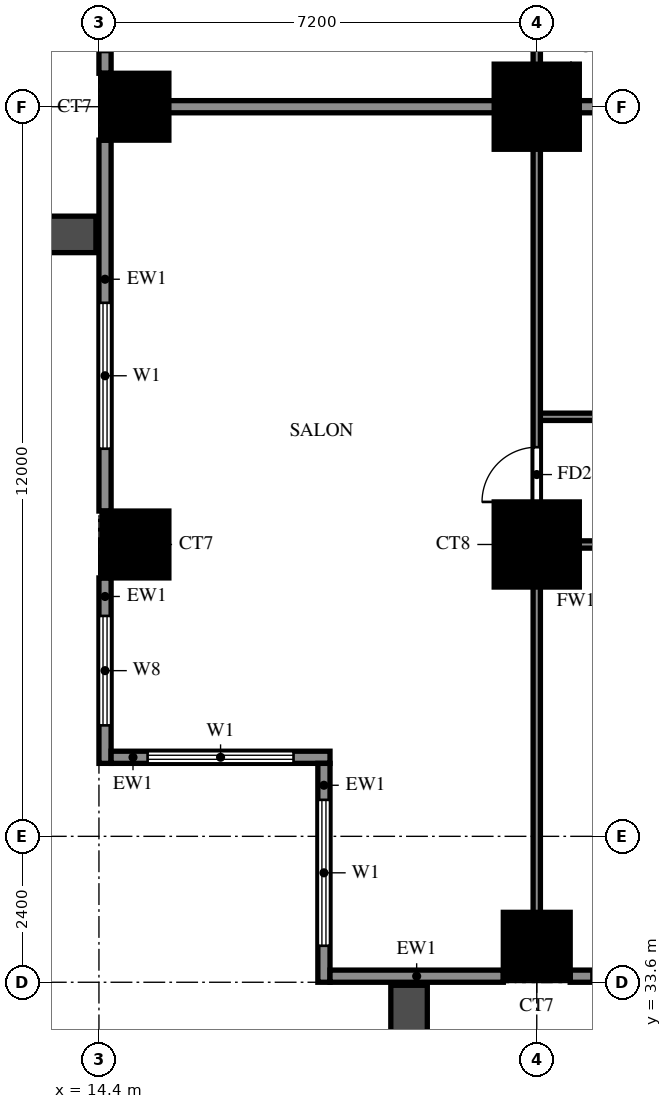
"""IFC4 building model, lengths in metres.
Left out: names, types, materials, properties, quantities, classifications, styles, units other than length and angle.
Written with IfcOpenShell. Run it as: python <this file> out.ifc"""

import sys

from ifc_helpers import new_model, si_unit, direction, frame, frame_2d, origin, origin_2d, place, context, subcontext, project, spatial, rectangle, extrude, source, transform, mapped, element, fill, save


model = new_model("IFC4")
c1 = context("Model", 3, precision=1e-05, world=origin(), true_north=direction((0.0, 1.0)))
c2 = subcontext(c1, "Body", "Model", "MODEL_VIEW")
j1 = project(units=[si_unit("LENGTHUNIT", "METRE"), si_unit("PLANEANGLEUNIT", "RADIAN")], contexts=[c1])
p1 = place(None, origin())
s1 = spatial("IfcSite", under=j1, at=p1, CompositionType="ELEMENT")
p2 = place(p1, origin())
s2 = spatial("IfcBuilding", under=s1, at=p2, CompositionType="ELEMENT")
p3 = place(p2, frame((0.0, 0.0, 41.0)))
s3 = spatial("IfcBuildingStorey", under=s2, at=p3, CompositionType="ELEMENT", Elevation=41.0)
m1 = source(origin(), c2, "Body", "SweptSolid", [
    extrude(rectangle(XDim=1.1, YDim=1.1, at=origin_2d()), origin(), (0.0, 0.0, 1.0), 3.18),
])
for number, where, z_axis, x_axis in (
    (1, (21.6, 34.2, 0.0), (0.0, 0.0, 1.0), (1.0, 0.0, 0.0)),
    (2, (15.0, 40.8, 0.0), (0.0, 0.0, 1.0), (1.0, 0.0, 0.0)),
):
    element("IfcColumn", number, at=place(p3, frame(where, z_axis=z_axis, x_axis=x_axis)), inside=s3, PredefinedType="COLUMN", context=c2, shape_type="MappedRepresentation", body=[
        mapped(m1, transform((0.0, 0.0, 0.0))),
    ])
m2 = source(origin(), c2, "Body", "SweptSolid", [
    extrude(rectangle(XDim=1.4, YDim=1.4, at=origin_2d()), origin(), (0.0, 0.0, 1.0), 3.18),
])
p4 = place(p3, frame((21.6, 40.8, 0.0), z_axis=(0.0, 0.0, 1.0), x_axis=(1.0, 0.0, 0.0)))
e3 = element("IfcColumn", 3, at=p4, inside=s3, PredefinedType="COLUMN", context=c2, shape_type="MappedRepresentation", body=[
    mapped(m2, transform((0.0, 0.0, 0.0))),
])
p5 = place(p3, frame((15.0, 48.0, 0.0), z_axis=(0.0, 0.0, 1.0), x_axis=(1.0, 0.0, 0.0)))
e4 = element("IfcColumn", 4, at=p5, inside=s3, PredefinedType="COLUMN", context=c2, shape_type="MappedRepresentation", body=[
    mapped(m1, transform((0.0, 0.0, 0.0))),
])
p6 = place(p3, frame((21.6, 48.0, 0.0), z_axis=(0.0, 0.0, 1.0), x_axis=(1.0, 0.0, 0.0)))
e5 = element("IfcColumn", 5, at=p6, inside=s3, PredefinedType="COLUMN", context=c2, shape_type="MappedRepresentation", body=[
    mapped(m2, transform((0.0, 0.0, 0.0))),
])
p7 = place(p3, frame((14.5, 54.65, 0.0), z_axis=(0.0, 0.0, 1.0), x_axis=(0.0, -1.0, 0.0)))
e6 = element("IfcWall", 6, at=p7, inside=s3, PredefinedType="SOLIDWALL", context=c2, shape_type="SweptSolid", body=[
    extrude(rectangle(XDim=6.1, YDim=0.2, at=frame_2d((3.05, 0.0))), origin(), (0.0, 0.0, 1.0), 3.18),
])
p8 = place(p7, frame((3.95, 0.0, 0.0)))
e7 = element("IfcOpeningElement", 7, at=p8, cuts=e6, PredefinedType="OPENING", context=c2, shape_type="SweptSolid", body=[
    extrude(rectangle(XDim=1.8, YDim=2.4, at=frame_2d((0.9, 1.2))), frame((0.0, 0.11, 0.0), z_axis=(0.0, -1.0, 0.0), x_axis=(1.0, 0.0, 0.0)), (0.0, 0.0, 1.0), 0.22),
])
p9 = place(p7, frame((0.425, 0.0, 0.6)))
e8 = element("IfcOpeningElement", 8, at=p9, cuts=e6, PredefinedType="OPENING", context=c2, shape_type="SweptSolid", body=[
    extrude(rectangle(XDim=1.2, YDim=2.4, at=frame_2d((0.6, 1.2))), frame((0.0, 0.11, 0.0), z_axis=(0.0, -1.0, 0.0), x_axis=(1.0, 0.0, 0.0)), (0.0, 0.0, 1.0), 0.22),
])
p10 = place(p3, frame((14.5, 47.45, 0.0), z_axis=(0.0, 0.0, 1.0), x_axis=(0.0, -1.0, 0.0)))
e9 = element("IfcWall", 9, at=p10, inside=s3, PredefinedType="SOLIDWALL", context=c2, shape_type="SweptSolid", body=[
    extrude(rectangle(XDim=6.1, YDim=0.2, at=frame_2d((3.05, 0.0))), origin(), (0.0, 0.0, 1.0), 3.18),
])
p11 = place(p10, frame((2.675, 0.0, 0.6)))
e10 = element("IfcOpeningElement", 10, at=p11, cuts=e9, PredefinedType="OPENING", context=c2, shape_type="SweptSolid", body=[
    extrude(rectangle(XDim=2.4, YDim=2.4, at=frame_2d((1.2, 1.2))), frame((0.0, 0.11, 0.0), z_axis=(0.0, -1.0, 0.0), x_axis=(1.0, 0.0, 0.0)), (0.0, 0.0, 1.0), 0.22),
])
p12 = place(p3, frame((14.5, 40.25, 0.0), z_axis=(0.0, 0.0, 1.0), x_axis=(0.0, -1.0, 0.0)))
e11 = element("IfcWall", 11, at=p12, inside=s3, PredefinedType="SOLIDWALL", context=c2, shape_type="SweptSolid", body=[
    extrude(rectangle(XDim=3.05, YDim=0.2, at=frame_2d((1.525, 0.0))), origin(), (0.0, 0.0, 1.0), 3.18),
])
p13 = place(p12, frame((0.625, 0.0, 0.6)))
e12 = element("IfcOpeningElement", 12, at=p13, cuts=e11, PredefinedType="OPENING", context=c2, shape_type="SweptSolid", body=[
    extrude(rectangle(XDim=1.8, YDim=2.4, at=frame_2d((0.9, 1.2))), frame((0.0, 0.11, 0.0), z_axis=(0.0, -1.0, 0.0), x_axis=(1.0, 0.0, 0.0)), (0.0, 0.0, 1.0), 0.22),
])
p14 = place(p3, frame((14.6, 37.3, 0.0), z_axis=(0.0, 0.0, 1.0), x_axis=(1.0, 0.0, 0.0)))
e13 = element("IfcWall", 13, at=p14, inside=s3, PredefinedType="SOLIDWALL", context=c2, shape_type="SweptSolid", body=[
    extrude(rectangle(XDim=3.6, YDim=0.2, at=frame_2d((1.8, 0.0))), origin(), (0.0, 0.0, 1.0), 3.18),
])
p15 = place(p14, frame((0.6, 0.0, 0.6)))
e14 = element("IfcOpeningElement", 14, at=p15, cuts=e13, PredefinedType="OPENING", context=c2, shape_type="SweptSolid", body=[
    extrude(rectangle(XDim=2.4, YDim=2.4, at=frame_2d((1.2, 1.2))), frame((0.0, 0.11, 0.0), z_axis=(0.0, -1.0, 0.0), x_axis=(1.0, 0.0, 0.0)), (0.0, 0.0, 1.0), 0.22),
])
p16 = place(p3, frame((18.1, 37.2, 0.0), z_axis=(0.0, 0.0, 1.0), x_axis=(0.0, -1.0, 0.0)))
e15 = element("IfcWall", 15, at=p16, inside=s3, PredefinedType="SOLIDWALL", context=c2, shape_type="SweptSolid", body=[
    extrude(rectangle(XDim=3.6, YDim=0.2, at=frame_2d((1.8, 0.0))), origin(), (0.0, 0.0, 1.0), 3.18),
])
p17 = place(p16, frame((0.6, 0.0, 0.6)))
e16 = element("IfcOpeningElement", 16, at=p17, cuts=e15, PredefinedType="OPENING", context=c2, shape_type="SweptSolid", body=[
    extrude(rectangle(XDim=2.4, YDim=2.4, at=frame_2d((1.2, 1.2))), frame((0.0, 0.11, 0.0), z_axis=(0.0, -1.0, 0.0), x_axis=(1.0, 0.0, 0.0)), (0.0, 0.0, 1.0), 0.22),
])
p18 = place(p3, frame((18.2, 33.7, 0.0), z_axis=(0.0, 0.0, 1.0), x_axis=(1.0, 0.0, 0.0)))
e17 = element("IfcWall", 17, at=p18, inside=s3, PredefinedType="SOLIDWALL", context=c2, shape_type="SweptSolid", body=[
    extrude(rectangle(XDim=2.85, YDim=0.2, at=frame_2d((1.425, 0.0))), origin(), (0.0, 0.0, 1.0), 3.18),
])
p19 = place(p3, frame((22.15, 33.7, 0.0), z_axis=(0.0, 0.0, 1.0), x_axis=(1.0, 0.0, 0.0)))
e18 = element("IfcWall", 18, at=p19, inside=s3, PredefinedType="SOLIDWALL", context=c2, shape_type="SweptSolid", body=[
    extrude(rectangle(XDim=6.1, YDim=0.2, at=frame_2d((3.05, 0.0))), origin(), (0.0, 0.0, 1.0), 3.18),
])
p20 = place(p19, frame((0.35, 0.0, 0.0)))
e19 = element("IfcOpeningElement", 19, at=p20, cuts=e18, PredefinedType="OPENING", context=c2, shape_type="SweptSolid", body=[
    extrude(rectangle(XDim=1.8, YDim=2.4, at=frame_2d((0.9, 1.2))), frame((0.0, 0.11, 0.0), z_axis=(0.0, -1.0, 0.0), x_axis=(1.0, 0.0, 0.0)), (0.0, 0.0, 1.0), 0.22),
])
p21 = place(p19, frame((4.625, 0.0, 1.5)))
e20 = element("IfcOpeningElement", 20, at=p21, cuts=e18, PredefinedType="OPENING", context=c2, shape_type="SweptSolid", body=[
    extrude(rectangle(XDim=0.9, YDim=0.9, at=frame_2d((0.45, 0.45))), frame((0.0, 0.11, 0.0), z_axis=(0.0, -1.0, 0.0), x_axis=(1.0, 0.0, 0.0)), (0.0, 0.0, 1.0), 0.22),
])
for number, where, z_axis, x_axis in (
    (21, (14.35, 45.9, 0.0), (0.0, 0.0, 1.0), (-1.0, 0.0, 0.0)),
    (22, (19.5, 33.55, 0.0), (0.0, 0.0, 1.0), (0.0, -1.0, 0.0)),
):
    element("IfcWall", number, at=place(p3, frame(where, z_axis=z_axis, x_axis=x_axis)), inside=s3, PredefinedType="SOLIDWALL", context=c2, shape_type="SweptSolid", body=[
        extrude(rectangle(XDim=2.65, YDim=0.6, at=frame_2d((1.325, 0.0))), origin(), (0.0, 0.0, 1.0), 2.85),
    ])
p22 = place(p3, frame((14.525, 48.0, 0.0), z_axis=(0.0, 0.0, 1.0), x_axis=(1.0, 0.0, 0.0)))
e23 = element("IfcWall", 23, at=p22, inside=s3, PredefinedType="SOLIDWALL", context=c2, shape_type="SweptSolid", body=[
    extrude(rectangle(XDim=19.075, YDim=0.2, at=frame_2d((9.538, 0.0))), origin(), (0.0, 0.0, 1.0), 3.18),
])
p23 = place(p3, frame((21.6, 40.8, 0.0), z_axis=(0.0, 0.0, 1.0), x_axis=(1.0, 0.0, 0.0)))
e24 = element("IfcWall", 24, at=p23, inside=s3, PredefinedType="PARTITIONING", context=c2, shape_type="SweptSolid", body=[
    extrude(rectangle(XDim=3.6, YDim=0.12, at=frame_2d((1.8, 0.0))), origin(), (0.0, 0.0, 1.0), 3.18),
])
p24 = place(p23, frame((1.35, 0.0, 0.0)))
e25 = element("IfcOpeningElement", 25, at=p24, cuts=e24, PredefinedType="OPENING", context=c2, shape_type="SweptSolid", body=[
    extrude(rectangle(XDim=0.9, YDim=2.1, at=frame_2d((0.45, 1.05))), frame((0.0, 0.07, 0.0), z_axis=(0.0, -1.0, 0.0), x_axis=(1.0, 0.0, 0.0)), (0.0, 0.0, 1.0), 0.14),
])
p25 = place(p3, frame((21.6, 42.9, 0.0), z_axis=(0.0, 0.0, 1.0), x_axis=(1.0, 0.0, 0.0)))
e26 = element("IfcWall", 26, at=p25, inside=s3, PredefinedType="PARTITIONING", context=c2, shape_type="SweptSolid", body=[
    extrude(rectangle(XDim=14.4, YDim=0.12, at=frame_2d((7.2, 0.0))), origin(), (0.0, 0.0, 1.0), 3.18),
])
p26 = place(p25, frame((2.1, 0.0, 0.0)))
e27 = element("IfcOpeningElement", 27, at=p26, cuts=e26, PredefinedType="OPENING", context=c2, shape_type="SweptSolid", body=[
    extrude(rectangle(XDim=0.9, YDim=2.1, at=frame_2d((0.45, 1.05))), frame((0.0, 0.07, 0.0), z_axis=(0.0, -1.0, 0.0), x_axis=(1.0, 0.0, 0.0)), (0.0, 0.0, 1.0), 0.14),
])
p27 = place(p25, frame((5.85, 0.0, 0.0)))
e28 = element("IfcOpeningElement", 28, at=p27, cuts=e26, PredefinedType="OPENING", context=c2, shape_type="SweptSolid", body=[
    extrude(rectangle(XDim=0.8, YDim=2.1, at=frame_2d((0.4, 1.05))), frame((0.0, 0.07, 0.0), z_axis=(0.0, -1.0, 0.0), x_axis=(1.0, 0.0, 0.0)), (0.0, 0.0, 1.0), 0.14),
])
p28 = place(p25, frame((9.25, 0.0, 0.0)))
e29 = element("IfcOpeningElement", 29, at=p28, cuts=e26, PredefinedType="OPENING", context=c2, shape_type="SweptSolid", body=[
    extrude(rectangle(XDim=0.9, YDim=2.1, at=frame_2d((0.45, 1.05))), frame((0.0, 0.07, 0.0), z_axis=(0.0, -1.0, 0.0), x_axis=(1.0, 0.0, 0.0)), (0.0, 0.0, 1.0), 0.14),
])
p29 = place(p3, frame((21.6, 33.725, 0.0), z_axis=(0.0, 0.0, 1.0), x_axis=(0.0, 1.0, 0.0)))
e30 = element("IfcWall", 30, at=p29, inside=s3, PredefinedType="PARTITIONING", context=c2, shape_type="SweptSolid", body=[
    extrude(rectangle(XDim=35.875, YDim=0.12, at=frame_2d((17.938, 0.0))), origin(), (0.0, 0.0, 1.0), 3.18),
])
p30 = place(p29, frame((7.775, 0.0, 0.0)))
e31 = element("IfcOpeningElement", 31, at=p30, cuts=e30, PredefinedType="OPENING", context=c2, shape_type="SweptSolid", body=[
    extrude(rectangle(XDim=0.9, YDim=2.1, at=frame_2d((0.45, 1.05))), frame((0.0, 0.07, 0.0), z_axis=(0.0, -1.0, 0.0), x_axis=(1.0, 0.0, 0.0)), (0.0, 0.0, 1.0), 0.14),
])
p31 = place(p29, frame((15.625, 0.0, 0.0)))
e32 = element("IfcOpeningElement", 32, at=p31, cuts=e30, PredefinedType="OPENING", context=c2, shape_type="SweptSolid", body=[
    extrude(rectangle(XDim=0.9, YDim=2.1, at=frame_2d((0.45, 1.05))), frame((0.0, 0.07, 0.0), z_axis=(0.0, -1.0, 0.0), x_axis=(1.0, 0.0, 0.0)), (0.0, 0.0, 1.0), 0.14),
])
p32 = place(p29, frame((22.225, 0.0, 0.0)))
e33 = element("IfcOpeningElement", 33, at=p32, cuts=e30, PredefinedType="OPENING", context=c2, shape_type="SweptSolid", body=[
    extrude(rectangle(XDim=1.5, YDim=2.1, at=frame_2d((0.75, 1.05))), frame((0.0, 0.07, 0.0), z_axis=(0.0, -1.0, 0.0), x_axis=(1.0, 0.0, 0.0)), (0.0, 0.0, 1.0), 0.14),
])
p33 = place(p29, frame((26.425, 0.0, 0.0)))
e34 = element("IfcOpeningElement", 34, at=p33, cuts=e30, PredefinedType="OPENING", context=c2, shape_type="SweptSolid", body=[
    extrude(rectangle(XDim=0.9, YDim=2.1, at=frame_2d((0.45, 1.05))), frame((0.0, 0.07, 0.0), z_axis=(0.0, -1.0, 0.0), x_axis=(1.0, 0.0, 0.0)), (0.0, 0.0, 1.0), 0.14),
])
p34 = place(p29, frame((31.825, 0.0, 0.0)))
e35 = element("IfcOpeningElement", 35, at=p34, cuts=e30, PredefinedType="OPENING", context=c2, shape_type="SweptSolid", body=[
    extrude(rectangle(XDim=0.9, YDim=2.1, at=frame_2d((0.45, 1.05))), frame((0.0, 0.07, 0.0), z_axis=(0.0, -1.0, 0.0), x_axis=(1.0, 0.0, 0.0)), (0.0, 0.0, 1.0), 0.14),
])
p35 = place(p11, origin())
e36 = element("IfcWindow", 36, at=p35, inside=s3, PartitioningType="DOUBLE_PANEL_VERTICAL", PredefinedType="WINDOW", context=c2, shape_type="SweptSolid", body=[
    extrude(rectangle(XDim=2.4, YDim=2.4, at=frame_2d((1.2, 1.2))), frame((0.0, 0.03, 0.0), z_axis=(0.0, -1.0, 0.0), x_axis=(1.0, 0.0, 0.0)), (0.0, 0.0, 1.0), 0.06),
])
fill(e10, e36)
p36 = place(p13, origin())
e37 = element("IfcWindow", 37, at=p36, inside=s3, PartitioningType="DOUBLE_PANEL_VERTICAL", PredefinedType="WINDOW", context=c2, shape_type="SweptSolid", body=[
    extrude(rectangle(XDim=1.8, YDim=2.4, at=frame_2d((0.9, 1.2))), frame((0.0, 0.03, 0.0), z_axis=(0.0, -1.0, 0.0), x_axis=(1.0, 0.0, 0.0)), (0.0, 0.0, 1.0), 0.06),
])
fill(e12, e37)
p37 = place(p15, origin())
e38 = element("IfcWindow", 38, at=p37, inside=s3, PartitioningType="DOUBLE_PANEL_VERTICAL", PredefinedType="WINDOW", context=c2, shape_type="SweptSolid", body=[
    extrude(rectangle(XDim=2.4, YDim=2.4, at=frame_2d((1.2, 1.2))), frame((0.0, 0.03, 0.0), z_axis=(0.0, -1.0, 0.0), x_axis=(1.0, 0.0, 0.0)), (0.0, 0.0, 1.0), 0.06),
])
fill(e14, e38)
p38 = place(p17, origin())
e39 = element("IfcWindow", 39, at=p38, inside=s3, PartitioningType="DOUBLE_PANEL_VERTICAL", PredefinedType="WINDOW", context=c2, shape_type="SweptSolid", body=[
    extrude(rectangle(XDim=2.4, YDim=2.4, at=frame_2d((1.2, 1.2))), frame((0.0, 0.03, 0.0), z_axis=(0.0, -1.0, 0.0), x_axis=(1.0, 0.0, 0.0)), (0.0, 0.0, 1.0), 0.06),
])
fill(e16, e39)
p39 = place(p20, origin())
e40 = element("IfcDoor", 40, at=p39, inside=s3, OperationType="DOUBLE_DOOR_SLIDING", PredefinedType="DOOR", context=c2, shape_type="SweptSolid", body=[
    extrude(rectangle(XDim=1.8, YDim=2.4, at=frame_2d((0.9, 1.2))), frame((0.0, 0.025, 0.0), z_axis=(0.0, -1.0, 0.0), x_axis=(1.0, 0.0, 0.0)), (0.0, 0.0, 1.0), 0.05),
])
fill(e19, e40)
p40 = place(p30, origin())
e41 = element("IfcDoor", 41, at=p40, inside=s3, OperationType="SINGLE_SWING_RIGHT", PredefinedType="DOOR", context=c2, shape_type="SweptSolid", body=[
    extrude(rectangle(XDim=0.9, YDim=2.1, at=frame_2d((0.45, 1.05))), frame((0.0, 0.025, 0.0), z_axis=(0.0, -1.0, 0.0), x_axis=(1.0, 0.0, 0.0)), (0.0, 0.0, 1.0), 0.05),
])
fill(e31, e41)
save(model, sys.argv[1])
